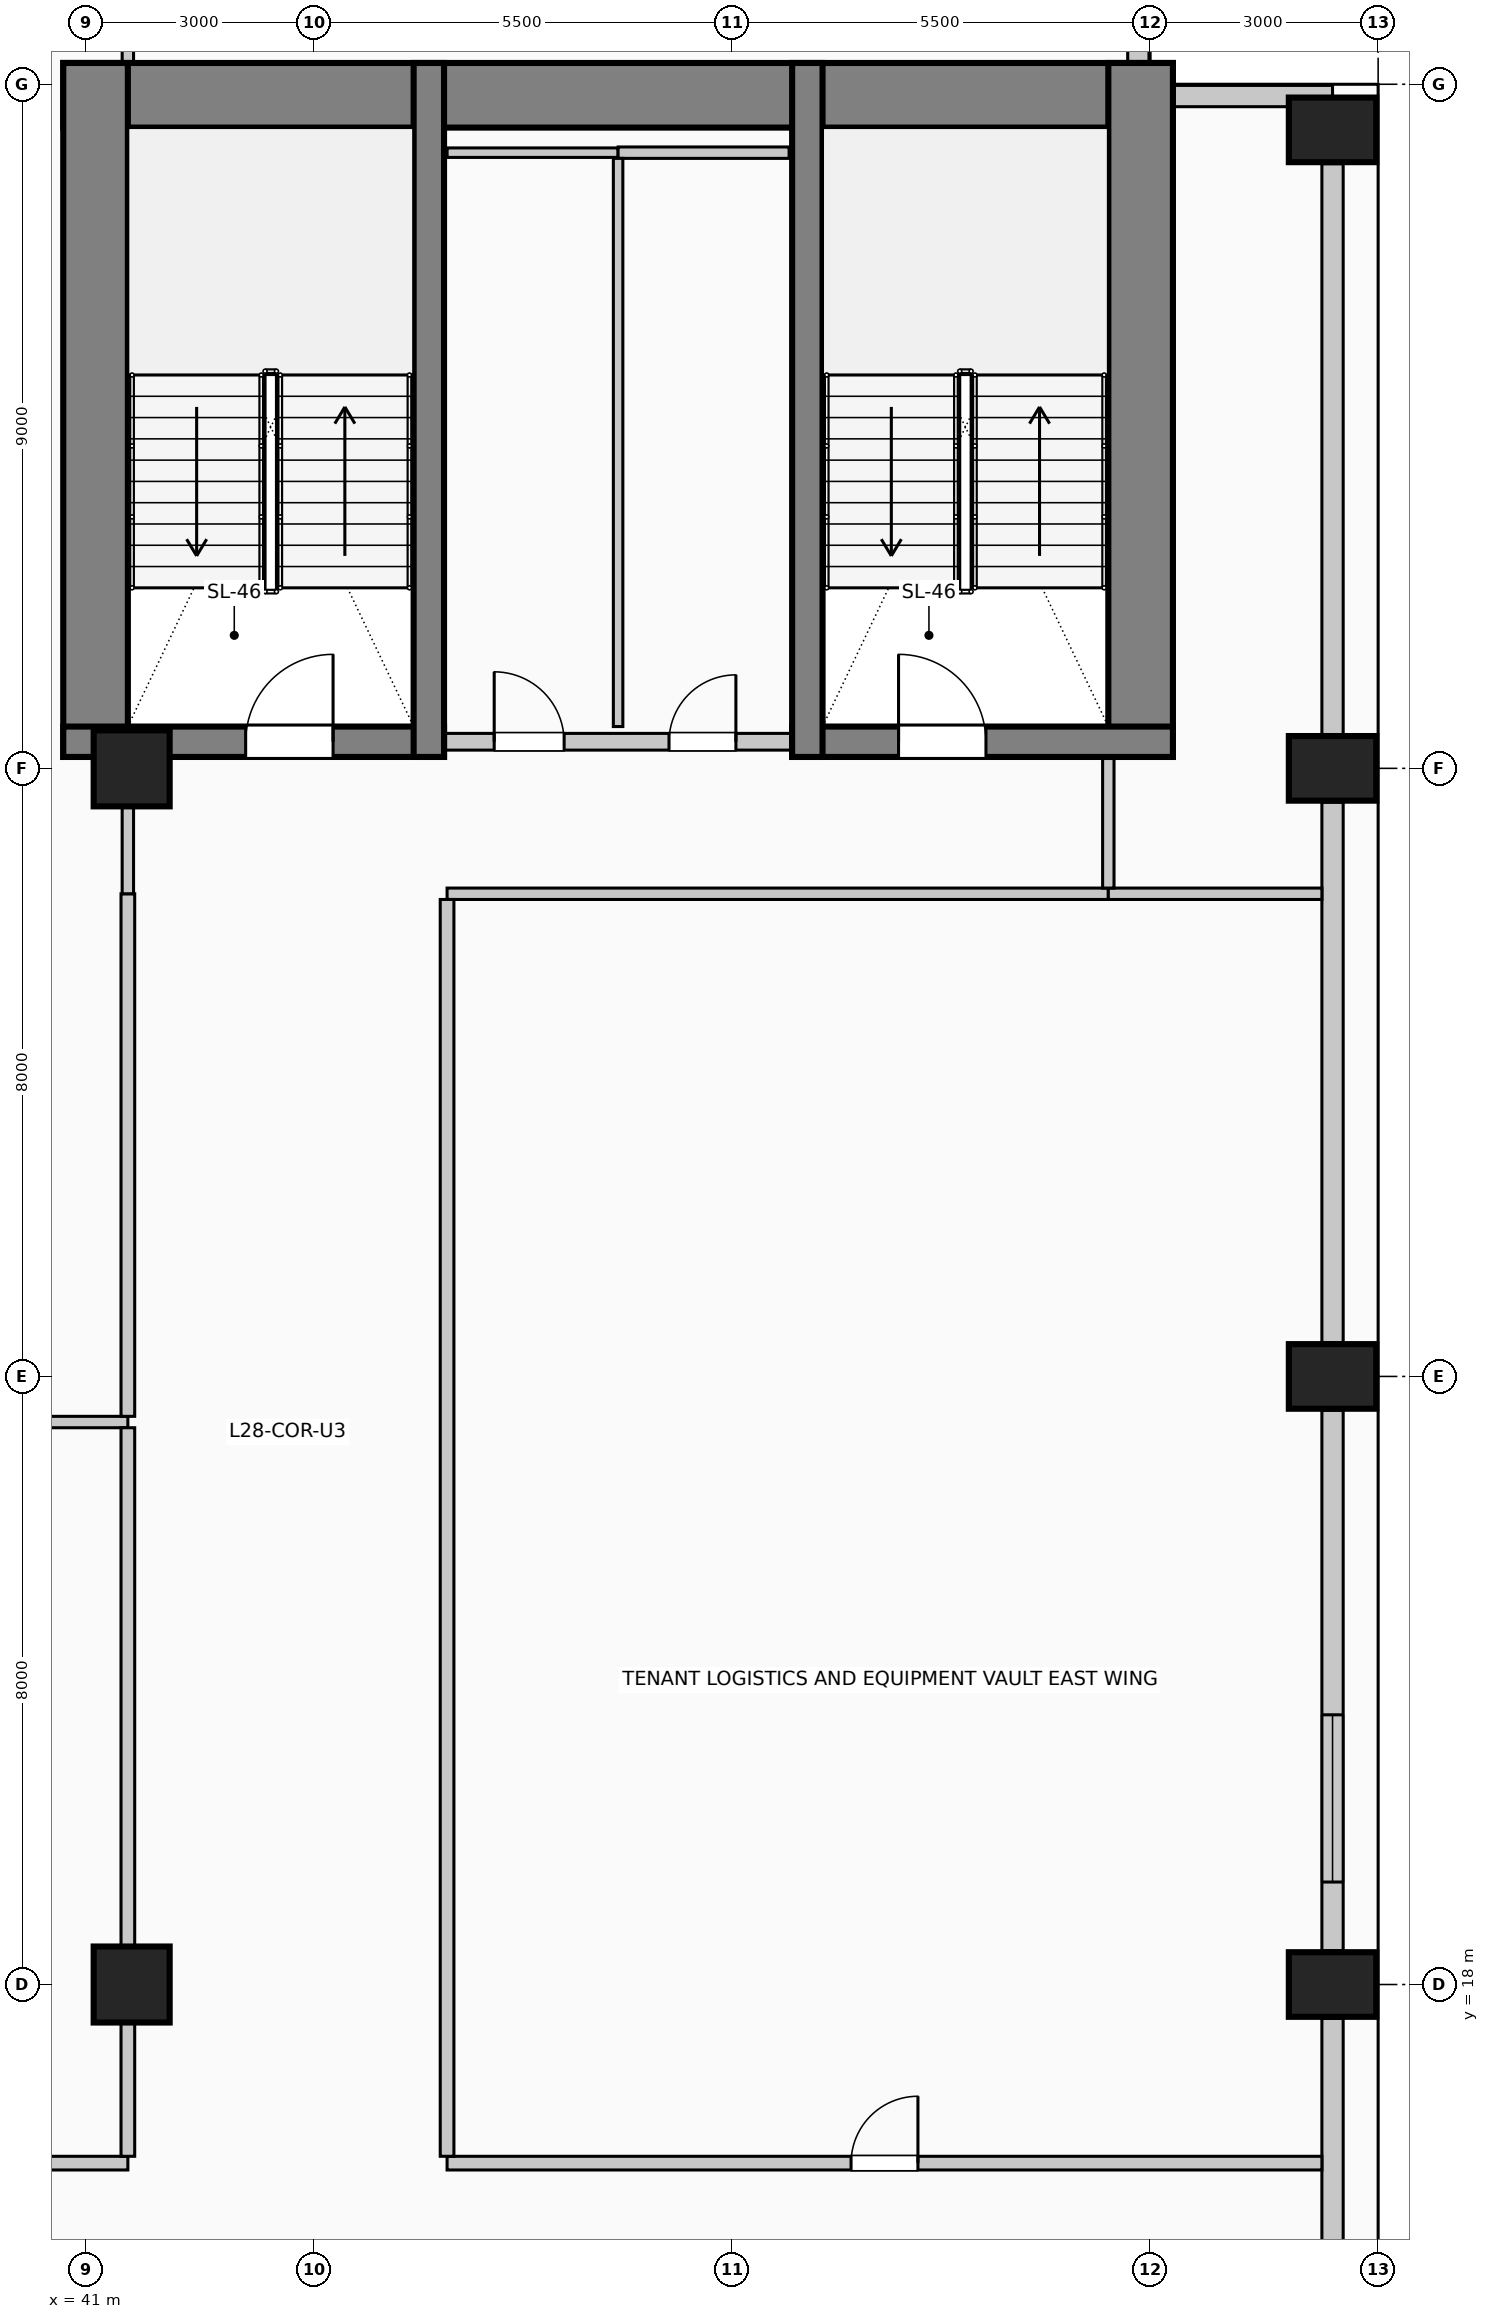
"""IFC4 building model, lengths in metres.
Left out: names, types, materials, properties, quantities, classifications, styles, units other than length and angle.
Written with IfcOpenShell. Run it as: python <this file> out.ifc"""

import sys

from ifc_helpers import new_model, si_unit, direction, frame, frame_2d, origin, origin_2d, place, context, subcontext, project, spatial, rectangle, circle, extrude, element, fill, save


model = new_model("IFC4")
c1 = context("Model", 3, precision=1e-05, world=origin(), true_north=direction((0.0, 1.0)))
c2 = subcontext(c1, "Body", "Model", "MODEL_VIEW")
j1 = project(units=[si_unit("LENGTHUNIT", "METRE"), si_unit("PLANEANGLEUNIT", "RADIAN")], contexts=[c1])
p1 = place(None, origin())
s1 = spatial("IfcSite", under=j1, at=p1, CompositionType="ELEMENT")
p2 = place(p1, origin())
s2 = spatial("IfcBuilding", under=s1, at=p2, CompositionType="ELEMENT")
p3 = place(p2, frame((0.0, 0.0, 116.6)))
s3 = spatial("IfcBuildingStorey", under=s2, at=p3, CompositionType="ELEMENT", Elevation=116.6)
p4 = place(p3, frame((40.7, 42.855, 0.0), z_axis=(0.0, 0.0, 1.0), x_axis=(1.0, 0.0, 0.0)))
e1 = element("IfcWall", 1, at=p4, inside=s3, PredefinedType="SHEAR", context=c2, shape_type="SweptSolid", body=[
    extrude(rectangle(XDim=14.6, YDim=0.85, at=frame_2d((7.3, 0.0))), origin(), (0.0, 0.0, 1.0), 4.0),
])
for number, where, z_axis, x_axis in (
    (2, (41.125, 34.15, 0.0), (0.0, 0.0, 1.0), (0.0, 1.0, 0.0)),
    (3, (54.875, 34.15, 0.0), (0.0, 0.0, 1.0), (0.0, 1.0, 0.0)),
):
    element("IfcWall", number, at=place(p3, frame(where, z_axis=z_axis, x_axis=x_axis)), inside=s3, PredefinedType="SHEAR", context=c2, shape_type="SweptSolid", body=[
        extrude(rectangle(XDim=9.13, YDim=0.85, at=frame_2d((4.565, 0.0))), origin(), (0.0, 0.0, 1.0), 4.0),
    ])
p5 = place(p3, frame((40.7, 34.35, 0.0), z_axis=(0.0, 0.0, 1.0), x_axis=(1.0, 0.0, 0.0)))
e4 = element("IfcWall", 4, at=p5, inside=s3, PredefinedType="SHEAR", context=c2, shape_type="SweptSolid", body=[
    extrude(rectangle(XDim=5.01, YDim=0.4, at=frame_2d((2.505, 0.0))), origin(), (0.0, 0.0, 1.0), 4.0),
])
p6 = place(p5, frame((2.4, 0.0, 0.0)))
e5 = element("IfcOpeningElement", 5, at=p6, cuts=e4, PredefinedType="OPENING", context=c2, shape_type="SweptSolid", body=[
    extrude(rectangle(XDim=1.15, YDim=2.2, at=frame_2d((0.575, 1.1))), frame((0.0, 0.21, 0.0), z_axis=(0.0, -1.0, 0.0), x_axis=(1.0, 0.0, 0.0)), (0.0, 0.0, 1.0), 0.42),
])
p7 = place(p3, frame((45.51, 34.15, 0.0), z_axis=(0.0, 0.0, 1.0), x_axis=(0.0, 1.0, 0.0)))
e6 = element("IfcWall", 6, at=p7, inside=s3, PredefinedType="SHEAR", context=c2, shape_type="SweptSolid", body=[
    extrude(rectangle(XDim=9.13, YDim=0.4, at=frame_2d((4.565, 0.0))), origin(), (0.0, 0.0, 1.0), 4.0),
])
p8 = place(p3, frame((50.29, 34.35, 0.0), z_axis=(0.0, 0.0, 1.0), x_axis=(1.0, 0.0, 0.0)))
e7 = element("IfcWall", 7, at=p8, inside=s3, PredefinedType="SHEAR", context=c2, shape_type="SweptSolid", body=[
    extrude(rectangle(XDim=5.01, YDim=0.4, at=frame_2d((2.505, 0.0))), origin(), (0.0, 0.0, 1.0), 4.0),
])
p9 = place(p8, frame((1.4, 0.0, 0.0)))
e8 = element("IfcOpeningElement", 8, at=p9, cuts=e7, PredefinedType="OPENING", context=c2, shape_type="SweptSolid", body=[
    extrude(rectangle(XDim=1.15, YDim=2.2, at=frame_2d((0.575, 1.1))), frame((0.0, 0.21, 0.0), z_axis=(0.0, -1.0, 0.0), x_axis=(1.0, 0.0, 0.0)), (0.0, 0.0, 1.0), 0.42),
])
p10 = place(p3, frame((50.49, 34.15, 0.0), z_axis=(0.0, 0.0, 1.0), x_axis=(0.0, 1.0, 0.0)))
e9 = element("IfcWall", 9, at=p10, inside=s3, PredefinedType="SHEAR", context=c2, shape_type="SweptSolid", body=[
    extrude(rectangle(XDim=9.13, YDim=0.4, at=frame_2d((4.565, 0.0))), origin(), (0.0, 0.0, 1.0), 4.0),
])
for number, where, z_axis, x_axis in (
    (10, (57.4, 18.0, 0.0), (0.0, 0.0, 1.0), (0.0, 1.0, 0.0)),
    (11, (57.4, 26.0, 0.0), (0.0, 0.0, 1.0), (0.0, 1.0, 0.0)),
    (12, (57.4, 34.0, 0.0), (0.0, 0.0, 1.0), (0.0, 1.0, 0.0)),
    (13, (57.4, 42.4, 0.0), (0.0, 0.0, 1.0), (0.0, 1.0, 0.0)),
):
    element("IfcColumn", number, at=place(p3, frame(where, z_axis=z_axis, x_axis=x_axis)), inside=s3, PredefinedType="COLUMN", context=c2, shape_type="SweptSolid", body=[
        extrude(rectangle(XDim=0.85, YDim=1.15, at=origin_2d()), origin(), (0.0, 0.0, 1.0), 4.0),
    ])
for number, where, z_axis, x_axis in (
    (14, (41.6, 18.0, 0.0), (0.0, 0.0, 1.0), (1.0, 0.0, 0.0)),
    (15, (41.6, 34.0, 0.0), (0.0, 0.0, 1.0), (1.0, 0.0, 0.0)),
):
    element("IfcColumn", number, at=place(p3, frame(where, z_axis=z_axis, x_axis=x_axis)), inside=s3, PredefinedType="COLUMN", context=c2, shape_type="SweptSolid", body=[
        extrude(circle(Radius=0.5, at=origin_2d()), origin(), (0.0, 0.0, 1.0), 4.0),
    ])
p11 = place(p3, frame((57.4, 17.555, 0.0), z_axis=(0.0, 0.0, 1.0), x_axis=(0.0, -1.0, 0.0)))
e16 = element("IfcWall", 16, at=p11, inside=s3, PredefinedType="SOLIDWALL", context=c2, shape_type="SweptSolid", body=[
    extrude(rectangle(XDim=7.11, YDim=0.28, at=frame_2d((3.555, 0.0))), origin(), (0.0, 0.0, 1.0), 2.875),
])
p12 = place(p3, frame((57.4, 25.555, 0.0), z_axis=(0.0, 0.0, 1.0), x_axis=(0.0, -1.0, 0.0)))
e17 = element("IfcWall", 17, at=p12, inside=s3, PredefinedType="SOLIDWALL", context=c2, shape_type="SweptSolid", body=[
    extrude(rectangle(XDim=7.11, YDim=0.28, at=frame_2d((3.555, 0.0))), origin(), (0.0, 0.0, 1.0), 2.875),
])
p13 = place(p12, frame((4.007, 0.0, 0.5)))
e18 = element("IfcOpeningElement", 18, at=p13, cuts=e17, PredefinedType="OPENING", context=c2, shape_type="SweptSolid", body=[
    extrude(rectangle(XDim=2.2, YDim=1.95, at=frame_2d((1.1, 0.975))), frame((0.0, 0.15, 0.0), z_axis=(0.0, -1.0, 0.0), x_axis=(1.0, 0.0, 0.0)), (0.0, 0.0, 1.0), 0.3),
])
p14 = place(p3, frame((57.4, 33.555, 0.0), z_axis=(0.0, 0.0, 1.0), x_axis=(0.0, -1.0, 0.0)))
e19 = element("IfcWall", 19, at=p14, inside=s3, PredefinedType="SOLIDWALL", context=c2, shape_type="SweptSolid", body=[
    extrude(rectangle(XDim=7.11, YDim=0.28, at=frame_2d((3.555, 0.0))), origin(), (0.0, 0.0, 1.0), 2.875),
])
p15 = place(p3, frame((57.4, 41.955, 0.0), z_axis=(0.0, 0.0, 1.0), x_axis=(0.0, -1.0, 0.0)))
e20 = element("IfcWall", 20, at=p15, inside=s3, PredefinedType="SOLIDWALL", context=c2, shape_type="SweptSolid", body=[
    extrude(rectangle(XDim=7.51, YDim=0.28, at=frame_2d((3.755, 0.0))), origin(), (0.0, 0.0, 1.0), 2.875),
])
p16 = place(p3, frame((54.845, 45.4, 0.0), z_axis=(0.0, 0.0, 1.0), x_axis=(0.0, -1.0, 0.0)))
e21 = element("IfcWall", 21, at=p16, inside=s3, PredefinedType="SOLIDWALL", context=c2, shape_type="SweptSolid", body=[
    extrude(rectangle(XDim=2.115, YDim=0.28, at=frame_2d((1.058, 0.0))), origin(), (0.0, 0.0, 1.0), 3.725),
])
p17 = place(p3, frame((55.305, 42.845, 0.0), z_axis=(0.0, 0.0, 1.0), x_axis=(1.0, 0.0, 0.0)))
e22 = element("IfcWall", 22, at=p17, inside=s3, PredefinedType="SOLIDWALL", context=c2, shape_type="SweptSolid", body=[
    extrude(rectangle(XDim=2.095, YDim=0.28, at=frame_2d((1.047, 0.0))), origin(), (0.0, 0.0, 1.0), 3.725),
])
p18 = place(p3, frame((45.72, 34.35, 0.0), z_axis=(0.0, 0.0, 1.0), x_axis=(1.0, 0.0, 0.0)))
e23 = element("IfcWall", 23, at=p18, inside=s3, PredefinedType="PARTITIONING", context=c2, shape_type="SweptSolid", body=[
    extrude(rectangle(XDim=4.56, YDim=0.22, at=frame_2d((2.28, 0.0))), origin(), (0.0, 0.0, 1.0), 3.725),
])
p19 = place(p18, frame((0.65, 0.0, 0.0)))
e24 = element("IfcOpeningElement", 24, at=p19, cuts=e23, PredefinedType="OPENING", context=c2, shape_type="SweptSolid", body=[
    extrude(rectangle(XDim=0.92, YDim=2.1, at=frame_2d((0.46, 1.05))), frame((0.0, 0.12, 0.0), z_axis=(0.0, -1.0, 0.0), x_axis=(1.0, 0.0, 0.0)), (0.0, 0.0, 1.0), 0.24),
])
p20 = place(p18, frame((2.95, 0.0, 0.0)))
e25 = element("IfcOpeningElement", 25, at=p20, cuts=e23, PredefinedType="OPENING", context=c2, shape_type="SweptSolid", body=[
    extrude(rectangle(XDim=0.88, YDim=2.1, at=frame_2d((0.44, 1.05))), frame((0.0, 0.12, 0.0), z_axis=(0.0, -1.0, 0.0), x_axis=(1.0, 0.0, 0.0)), (0.0, 0.0, 1.0), 0.24),
])
p21 = place(p3, frame((27.5, 15.65, 0.0), z_axis=(0.0, 0.0, 1.0), x_axis=(1.0, 0.0, 0.0)))
e26 = element("IfcWall", 26, at=p21, inside=s3, PredefinedType="PARTITIONING", context=c2, shape_type="SweptSolid", body=[
    extrude(rectangle(XDim=14.05, YDim=0.18, at=frame_2d((7.025, 0.0))), origin(), (0.0, 0.0, 1.0), 3.725),
])
p22 = place(p21, frame((6.55, 0.0, 0.0)))
e27 = element("IfcOpeningElement", 27, at=p22, cuts=e26, PredefinedType="OPENING", context=c2, shape_type="SweptSolid", body=[
    extrude(rectangle(XDim=0.95, YDim=2.15, at=frame_2d((0.475, 1.075))), frame((0.0, 0.1, 0.0), z_axis=(0.0, -1.0, 0.0), x_axis=(1.0, 0.0, 0.0)), (0.0, 0.0, 1.0), 0.2),
])
p23 = place(p3, frame((45.75, 15.65, 0.0), z_axis=(0.0, 0.0, 1.0), x_axis=(1.0, 0.0, 0.0)))
e28 = element("IfcWall", 28, at=p23, inside=s3, PredefinedType="PARTITIONING", context=c2, shape_type="SweptSolid", body=[
    extrude(rectangle(XDim=11.51, YDim=0.18, at=frame_2d((5.755, 0.0))), origin(), (0.0, 0.0, 1.0), 3.725),
])
p24 = place(p23, frame((5.315, 0.0, 0.0)))
e29 = element("IfcOpeningElement", 29, at=p24, cuts=e28, PredefinedType="OPENING", context=c2, shape_type="SweptSolid", body=[
    extrude(rectangle(XDim=0.88, YDim=2.1, at=frame_2d((0.44, 1.05))), frame((0.0, 0.1, 0.0), z_axis=(0.0, -1.0, 0.0), x_axis=(1.0, 0.0, 0.0)), (0.0, 0.0, 1.0), 0.2),
])
p25 = place(p3, frame((27.5, 25.4, 0.0), z_axis=(0.0, 0.0, 1.0), x_axis=(1.0, 0.0, 0.0)))
e30 = element("IfcWall", 30, at=p25, inside=s3, PredefinedType="PARTITIONING", context=c2, shape_type="SweptSolid", body=[
    extrude(rectangle(XDim=14.05, YDim=0.15, at=frame_2d((7.025, 0.0))), origin(), (0.0, 0.0, 1.0), 3.17),
])
p26 = place(p3, frame((45.75, 32.35, 0.0), z_axis=(0.0, 0.0, 1.0), x_axis=(1.0, 0.0, 0.0)))
e31 = element("IfcWall", 31, at=p26, inside=s3, PredefinedType="PARTITIONING", context=c2, shape_type="SweptSolid", body=[
    extrude(rectangle(XDim=8.7, YDim=0.15, at=frame_2d((4.35, 0.0))), origin(), (0.0, 0.0, 1.0), 3.725),
])
p27 = place(p3, frame((54.45, 32.35, 0.0), z_axis=(0.0, 0.0, 1.0), x_axis=(1.0, 0.0, 0.0)))
e32 = element("IfcWall", 32, at=p27, inside=s3, PredefinedType="PARTITIONING", context=c2, shape_type="SweptSolid", body=[
    extrude(rectangle(XDim=2.81, YDim=0.15, at=frame_2d((1.405, 0.0))), origin(), (0.0, 0.0, 1.0), 3.725),
])
p28 = place(p3, frame((45.75, 42.1, 0.0), z_axis=(0.0, 0.0, 1.0), x_axis=(1.0, 0.0, 0.0)))
e33 = element("IfcWall", 33, at=p28, inside=s3, PredefinedType="PARTITIONING", context=c2, shape_type="SweptSolid", body=[
    extrude(rectangle(XDim=2.25, YDim=0.125, at=frame_2d((1.125, 0.0))), origin(), (0.0, 0.0, 1.0), 3.725),
])
p29 = place(p3, frame((48.0, 42.1, 0.0), z_axis=(0.0, 0.0, 1.0), x_axis=(1.0, 0.0, 0.0)))
e34 = element("IfcWall", 34, at=p29, inside=s3, PredefinedType="PARTITIONING", context=c2, shape_type="SweptSolid", body=[
    extrude(rectangle(XDim=2.25, YDim=0.15, at=frame_2d((1.125, 0.0))), origin(), (0.0, 0.0, 1.0), 3.725),
])
p30 = place(p3, frame((41.55, 15.74, 0.0), z_axis=(0.0, 0.0, 1.0), x_axis=(0.0, 1.0, 0.0)))
e35 = element("IfcWall", 35, at=p30, inside=s3, PredefinedType="PARTITIONING", context=c2, shape_type="SweptSolid", body=[
    extrude(rectangle(XDim=1.76, YDim=0.18, at=frame_2d((0.88, 0.0))), origin(), (0.0, 0.0, 1.0), 3.07),
])
p31 = place(p3, frame((41.55, 18.5, 0.0), z_axis=(0.0, 0.0, 1.0), x_axis=(0.0, 1.0, 0.0)))
e36 = element("IfcWall", 36, at=p31, inside=s3, PredefinedType="PARTITIONING", context=c2, shape_type="SweptSolid", body=[
    extrude(rectangle(XDim=6.825, YDim=0.18, at=frame_2d((3.413, 0.0))), origin(), (0.0, 0.0, 1.0), 3.07),
])
p32 = place(p3, frame((41.55, 25.475, 0.0), z_axis=(0.0, 0.0, 1.0), x_axis=(0.0, 1.0, 0.0)))
e37 = element("IfcWall", 37, at=p32, inside=s3, PredefinedType="PARTITIONING", context=c2, shape_type="SweptSolid", body=[
    extrude(rectangle(XDim=6.875, YDim=0.18, at=frame_2d((3.438, 0.0))), origin(), (0.0, 0.0, 1.0), 3.07),
])
p33 = place(p3, frame((41.55, 32.35, 0.0), z_axis=(0.0, 0.0, 1.0), x_axis=(0.0, 1.0, 0.0)))
e38 = element("IfcWall", 38, at=p33, inside=s3, PredefinedType="PARTITIONING", context=c2, shape_type="SweptSolid", body=[
    extrude(rectangle(XDim=1.15, YDim=0.15, at=frame_2d((0.575, 0.0))), origin(), (0.0, 0.0, 1.0), 3.07),
])
p34 = place(p3, frame((41.55, 43.28, 0.0), z_axis=(0.0, 0.0, 1.0), x_axis=(0.0, 1.0, 0.0)))
e39 = element("IfcWall", 39, at=p34, inside=s3, PredefinedType="PARTITIONING", context=c2, shape_type="SweptSolid", body=[
    extrude(rectangle(XDim=1.42, YDim=0.15, at=frame_2d((0.71, 0.0))), origin(), (0.0, 0.0, 1.0), 3.725),
])
p35 = place(p3, frame((45.75, 15.74, 0.0), z_axis=(0.0, 0.0, 1.0), x_axis=(0.0, 1.0, 0.0)))
e40 = element("IfcWall", 40, at=p35, inside=s3, PredefinedType="PARTITIONING", context=c2, shape_type="SweptSolid", body=[
    extrude(rectangle(XDim=16.535, YDim=0.18, at=frame_2d((8.268, 0.0))), origin(), (0.0, 0.0, 1.0), 3.725),
])
p36 = place(p3, frame((48.0, 34.55, 0.0), z_axis=(0.0, 0.0, 1.0), x_axis=(0.0, 1.0, 0.0)))
e41 = element("IfcWall", 41, at=p36, inside=s3, PredefinedType="PARTITIONING", context=c2, shape_type="SweptSolid", body=[
    extrude(rectangle(XDim=7.475, YDim=0.125, at=frame_2d((3.737, 0.0))), origin(), (0.0, 0.0, 1.0), 3.725),
])
p37 = place(p3, frame((54.45, 32.425, 0.0), z_axis=(0.0, 0.0, 1.0), x_axis=(0.0, 1.0, 0.0)))
e42 = element("IfcWall", 42, at=p37, inside=s3, PredefinedType="PARTITIONING", context=c2, shape_type="SweptSolid", body=[
    extrude(rectangle(XDim=1.725, YDim=0.15, at=frame_2d((0.862, 0.0))), origin(), (0.0, 0.0, 1.0), 3.725),
])
p38 = place(p13, origin())
e43 = element("IfcWindow", 43, at=p38, inside=s3, PartitioningType="SINGLE_PANEL", PredefinedType="WINDOW", context=c2, shape_type="SweptSolid", body=[
    extrude(rectangle(XDim=2.2, YDim=1.95, at=frame_2d((1.1, 0.975))), frame((0.0, 0.03, 0.0), z_axis=(0.0, -1.0, 0.0), x_axis=(1.0, 0.0, 0.0)), (0.0, 0.0, 1.0), 0.06),
])
fill(e18, e43)
p39 = place(p6, origin())
e44 = element("IfcDoor", 44, at=p39, inside=s3, OperationType="SINGLE_SWING_RIGHT", PredefinedType="DOOR", context=c2, shape_type="SweptSolid", body=[
    extrude(rectangle(XDim=1.15, YDim=2.2, at=frame_2d((0.575, 1.1))), frame((0.0, 0.025, 0.0), z_axis=(0.0, -1.0, 0.0), x_axis=(1.0, 0.0, 0.0)), (0.0, 0.0, 1.0), 0.05),
])
fill(e5, e44)
p40 = place(p19, origin())
e45 = element("IfcDoor", 45, at=p40, inside=s3, OperationType="SINGLE_SWING_LEFT", PredefinedType="DOOR", context=c2, shape_type="SweptSolid", body=[
    extrude(rectangle(XDim=0.92, YDim=2.1, at=frame_2d((0.46, 1.05))), frame((0.0, 0.025, 0.0), z_axis=(0.0, -1.0, 0.0), x_axis=(1.0, 0.0, 0.0)), (0.0, 0.0, 1.0), 0.05),
])
fill(e24, e45)
p41 = place(p20, origin())
e46 = element("IfcDoor", 46, at=p41, inside=s3, OperationType="SINGLE_SWING_RIGHT", PredefinedType="DOOR", context=c2, shape_type="SweptSolid", body=[
    extrude(rectangle(XDim=0.88, YDim=2.1, at=frame_2d((0.44, 1.05))), frame((0.0, 0.025, 0.0), z_axis=(0.0, -1.0, 0.0), x_axis=(1.0, 0.0, 0.0)), (0.0, 0.0, 1.0), 0.05),
])
fill(e25, e46)
p42 = place(p9, origin())
e47 = element("IfcDoor", 47, at=p42, inside=s3, OperationType="SINGLE_SWING_LEFT", PredefinedType="DOOR", context=c2, shape_type="SweptSolid", body=[
    extrude(rectangle(XDim=1.15, YDim=2.2, at=frame_2d((0.575, 1.1))), frame((0.0, 0.025, 0.0), z_axis=(0.0, -1.0, 0.0), x_axis=(1.0, 0.0, 0.0)), (0.0, 0.0, 1.0), 0.05),
])
fill(e8, e47)
p43 = place(p24, origin())
e48 = element("IfcDoor", 48, at=p43, inside=s3, OperationType="SINGLE_SWING_RIGHT", PredefinedType="DOOR", context=c2, shape_type="SweptSolid", body=[
    extrude(rectangle(XDim=0.88, YDim=2.1, at=frame_2d((0.44, 1.05))), frame((0.0, 0.025, 0.0), z_axis=(0.0, -1.0, 0.0), x_axis=(1.0, 0.0, 0.0)), (0.0, 0.0, 1.0), 0.05),
])
fill(e29, e48)
save(model, sys.argv[1])
